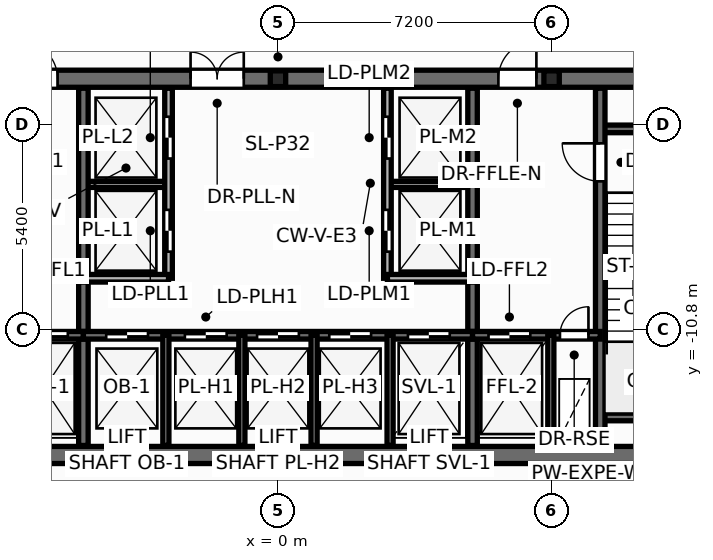
"""IFC4 building model, lengths in metres.
Left out: names, types, materials, properties, quantities, classifications, styles, units other than length and angle.
Written with IfcOpenShell. Run it as: python <this file> out.ifc"""

import sys

from ifc_helpers import new_model, si_unit, direction, frame, frame_2d, origin, origin_2d, place, context, subcontext, project, spatial, rectangle, i_section, extrude, element, fill, save


model = new_model("IFC4")
c1 = context("Model", 3, precision=1e-05, world=origin(), true_north=direction((0.0, 1.0)))
c2 = subcontext(c1, "Body", "Model", "MODEL_VIEW")
j1 = project(units=[si_unit("LENGTHUNIT", "METRE"), si_unit("PLANEANGLEUNIT", "RADIAN")], contexts=[c1])
p1 = place(None, origin())
s1 = spatial("IfcSite", under=j1, at=p1, CompositionType="ELEMENT")
p2 = place(p1, origin())
s2 = spatial("IfcBuilding", under=s1, at=p2, CompositionType="ELEMENT")
p3 = place(p2, origin())
s3 = spatial("IfcBuildingStorey", under=s2, at=p3, CompositionType="ELEMENT", Elevation=0.0)
for number, where, z_axis, x_axis in (
    (1, (0.0, -4.2, 0.0), (0.0, 0.0, 1.0), (1.0, 0.0, 0.0)),
    (2, (7.2, -4.2, 0.0), (0.0, 0.0, 1.0), (1.0, 0.0, 0.0)),
):
    element("IfcColumn", number, at=place(p3, frame(where, z_axis=z_axis, x_axis=x_axis)), inside=s3, PredefinedType="PILASTER", context=c2, shape_type="SweptSolid", body=[
        extrude(i_section(OverallWidth=0.405, OverallDepth=0.414, WebThickness=0.022, FlangeThickness=0.032, at=origin_2d()), origin(), (0.0, 0.0, 1.0), 5.4),
    ])
p4 = place(p3, frame((5.583, 11.29, -0.015), z_axis=(0.0, 0.0, 1.0), x_axis=(0.616945483616, -0.787005889588, 0.0)))
e3 = element("IfcWall", 3, at=p4, inside=s3, PredefinedType="STANDARD", context=c2, shape_type="SweptSolid", body=[
    extrude(rectangle(XDim=28.627, YDim=0.28, at=frame_2d((14.314, 0.0))), origin(), (0.0, 0.0, 1.0), 3.91),
])
p5 = place(p4, frame((2.979, 0.0, 0.015)))
e4 = element("IfcOpeningElement", 4, at=p5, cuts=e3, PredefinedType="OPENING", context=c2, shape_type="SweptSolid", body=[
    extrude(rectangle(XDim=1.206, YDim=2.154, at=frame_2d((0.6, 1.077))), frame((0.0, 0.15, 0.0), z_axis=(0.0, -1.0, 0.0), x_axis=(1.0, 0.0, 0.0)), (0.0, 0.0, 1.0), 0.3),
])
p6 = place(p3, frame((-23.245, -11.24, -0.015), z_axis=(0.0, 0.0, 1.0), x_axis=(0.616945483616, 0.787005889588, 0.0)))
e5 = element("IfcWall", 5, at=p6, inside=s3, PredefinedType="STANDARD", context=c2, shape_type="SweptSolid", body=[
    extrude(rectangle(XDim=28.627, YDim=0.28, at=frame_2d((14.314, 0.0))), origin(), (0.0, 0.0, 1.0), 3.91),
])
for number, where, z_axis, x_axis in (
    (6, (-5.12, -6.98, 0.0), (0.0, 0.0, 1.0), (1.0, 0.0, 0.0)),
    (7, (2.88, -6.98, 0.0), (0.0, 0.0, 1.0), (1.0, 0.0, 0.0)),
):
    element("IfcWall", number, at=place(p3, frame(where, z_axis=z_axis, x_axis=x_axis)), inside=s3, PredefinedType="PARTITIONING", context=c2, shape_type="SweptSolid", body=[
        extrude(rectangle(XDim=2.24, YDim=0.16, at=frame_2d((1.12, 0.0))), origin(), (0.0, 0.0, 1.0), 5.12),
    ])
p7 = place(p3, frame((-12.75, -14.1, 0.0), z_axis=(0.0, 0.0, 1.0), x_axis=(1.0, 0.0, 0.0)))
e8 = element("IfcWall", 8, at=p7, inside=s3, PredefinedType="SHEAR", context=c2, shape_type="SweptSolid", body=[
    extrude(rectangle(XDim=25.5, YDim=0.45, at=frame_2d((12.75, 0.0))), origin(), (0.0, 0.0, 1.0), 5.4),
])
p8 = place(p3, frame((-12.65, -4.2, 0.0), z_axis=(0.0, 0.0, 1.0), x_axis=(1.0, 0.0, 0.0)))
e9 = element("IfcWall", 9, at=p8, inside=s3, PredefinedType="SHEAR", context=c2, shape_type="SweptSolid", body=[
    extrude(rectangle(XDim=25.3, YDim=0.45, at=frame_2d((12.65, 0.0))), origin(), (0.0, 0.0, 1.0), 5.4),
])
p9 = place(p8, frame((1.85, 0.0, 0.0)))
e10 = element("IfcOpeningElement", 10, at=p9, cuts=e9, PredefinedType="OPENING", context=c2, shape_type="SweptSolid", body=[
    extrude(rectangle(XDim=0.756, YDim=2.054, at=frame_2d((0.375, 1.027))), frame((0.0, 0.235, 0.0), z_axis=(0.0, -1.0, 0.0), x_axis=(1.0, 0.0, 0.0)), (0.0, 0.0, 1.0), 0.47),
])
p10 = place(p8, frame((22.65, 0.0, 0.0)))
e11 = element("IfcOpeningElement", 11, at=p10, cuts=e9, PredefinedType="OPENING", context=c2, shape_type="SweptSolid", body=[
    extrude(rectangle(XDim=0.756, YDim=2.054, at=frame_2d((0.375, 1.027))), frame((0.0, 0.235, 0.0), z_axis=(0.0, -1.0, 0.0), x_axis=(1.0, 0.0, 0.0)), (0.0, 0.0, 1.0), 0.47),
])
p11 = place(p8, frame((5.85, 0.0, 0.0)))
e12 = element("IfcOpeningElement", 12, at=p11, cuts=e9, PredefinedType="OPENING", context=c2, shape_type="SweptSolid", body=[
    extrude(rectangle(XDim=1.006, YDim=2.104, at=frame_2d((0.5, 1.052))), frame((0.0, 0.235, 0.0), z_axis=(0.0, -1.0, 0.0), x_axis=(1.0, 0.0, 0.0)), (0.0, 0.0, 1.0), 0.47),
])
p12 = place(p8, frame((10.35, 0.0, 0.0)))
e13 = element("IfcOpeningElement", 13, at=p12, cuts=e9, PredefinedType="OPENING", context=c2, shape_type="SweptSolid", body=[
    extrude(rectangle(XDim=1.406, YDim=2.154, at=frame_2d((0.7, 1.077))), frame((0.0, 0.235, 0.0), z_axis=(0.0, -1.0, 0.0), x_axis=(1.0, 0.0, 0.0)), (0.0, 0.0, 1.0), 0.47),
])
p13 = place(p8, frame((18.45, 0.0, 0.0)))
e14 = element("IfcOpeningElement", 14, at=p13, cuts=e9, PredefinedType="OPENING", context=c2, shape_type="SweptSolid", body=[
    extrude(rectangle(XDim=1.006, YDim=2.104, at=frame_2d((0.5, 1.052))), frame((0.0, 0.235, 0.0), z_axis=(0.0, -1.0, 0.0), x_axis=(1.0, 0.0, 0.0)), (0.0, 0.0, 1.0), 0.47),
])
for number, where, z_axis, x_axis in (
    (15, (8.48, -5.52, 0.0), (0.0, 0.0, 1.0), (1.0, 0.0, 0.0)),
    (16, (8.48, -13.1, 0.0), (0.0, 0.0, 1.0), (1.0, 0.0, 0.0)),
):
    element("IfcWall", number, at=place(p3, frame(where, z_axis=z_axis, x_axis=x_axis)), inside=s3, PredefinedType="SOLIDWALL", context=c2, shape_type="SweptSolid", body=[
        extrude(rectangle(XDim=3.87, YDim=0.2, at=frame_2d((1.935, 0.0))), origin(), (0.0, 0.0, 1.0), 5.4),
    ])
p14 = place(p3, frame((8.48, -13.85, 0.0), z_axis=(0.0, 0.0, 1.0), x_axis=(0.0, 1.0, 0.0)))
e17 = element("IfcWall", 17, at=p14, inside=s3, PredefinedType="SHEAR", context=c2, shape_type="SweptSolid", body=[
    extrude(rectangle(XDim=9.4, YDim=0.25, at=frame_2d((4.7, 0.0))), origin(), (0.0, 0.0, 1.0), 5.4),
])
p15 = place(p14, frame((6.95, 0.0, 0.0)))
e18 = element("IfcOpeningElement", 18, at=p15, cuts=e17, PredefinedType="OPENING", context=c2, shape_type="SweptSolid", body=[
    extrude(rectangle(XDim=1.006, YDim=2.104, at=frame_2d((0.5, 1.052))), frame((0.0, 0.135, 0.0), z_axis=(0.0, -1.0, 0.0), x_axis=(1.0, 0.0, 0.0)), (0.0, 0.0, 1.0), 0.27),
])
for number, where, z_axis, x_axis in (
    (19, (-5.12, -13.85, 0.0), (0.0, 0.0, 1.0), (0.0, 1.0, 0.0)),
    (20, (5.12, -13.85, 0.0), (0.0, 0.0, 1.0), (0.0, 1.0, 0.0)),
):
    element("IfcWall", number, at=place(p3, frame(where, z_axis=z_axis, x_axis=x_axis)), inside=s3, PredefinedType="SHEAR", context=c2, shape_type="SweptSolid", body=[
        extrude(rectangle(XDim=9.4, YDim=0.25, at=frame_2d((4.7, 0.0))), origin(), (0.0, 0.0, 1.0), 5.4),
    ])
p16 = place(p3, frame((-8.48, -10.95, 0.0), z_axis=(0.0, 0.0, 1.0), x_axis=(1.0, 0.0, 0.0)))
e21 = element("IfcWall", 21, at=p16, inside=s3, PredefinedType="SOLIDWALL", context=c2, shape_type="SweptSolid", body=[
    extrude(rectangle(XDim=3.36, YDim=0.2, at=frame_2d((1.68, 0.0))), origin(), (0.0, 0.0, 1.0), 5.4),
])
p17 = place(p16, frame((0.28, 0.0, 0.0)))
e22 = element("IfcOpeningElement", 22, at=p17, cuts=e21, PredefinedType="OPENING", context=c2, shape_type="SweptSolid", body=[
    extrude(rectangle(XDim=0.756, YDim=2.054, at=frame_2d((0.375, 1.027))), frame((0.0, 0.11, 0.0), z_axis=(0.0, -1.0, 0.0), x_axis=(1.0, 0.0, 0.0)), (0.0, 0.0, 1.0), 0.22),
])
p18 = place(p16, frame((1.85, 0.0, 0.0)))
e23 = element("IfcOpeningElement", 23, at=p18, cuts=e21, PredefinedType="OPENING", context=c2, shape_type="SweptSolid", body=[
    extrude(rectangle(XDim=1.106, YDim=2.104, at=frame_2d((0.55, 1.052))), frame((0.0, 0.11, 0.0), z_axis=(0.0, -1.0, 0.0), x_axis=(1.0, 0.0, 0.0)), (0.0, 0.0, 1.0), 0.22),
])
p19 = place(p3, frame((-5.12, -10.95, 0.0), z_axis=(0.0, 0.0, 1.0), x_axis=(1.0, 0.0, 0.0)))
e24 = element("IfcWall", 24, at=p19, inside=s3, PredefinedType="SOLIDWALL", context=c2, shape_type="SweptSolid", body=[
    extrude(rectangle(XDim=10.24, YDim=0.2, at=frame_2d((5.12, 0.0))), origin(), (0.0, 0.0, 1.0), 5.4),
])
p20 = place(p19, frame((0.6, 0.0, 0.0)))
e25 = element("IfcOpeningElement", 25, at=p20, cuts=e24, PredefinedType="OPENING", context=c2, shape_type="SweptSolid", body=[
    extrude(rectangle(XDim=1.106, YDim=2.104, at=frame_2d((0.55, 1.052))), frame((0.0, 0.11, 0.0), z_axis=(0.0, -1.0, 0.0), x_axis=(1.0, 0.0, 0.0)), (0.0, 0.0, 1.0), 0.22),
])
p21 = place(p19, frame((2.67, 0.0, 0.0)))
e26 = element("IfcOpeningElement", 26, at=p21, cuts=e24, PredefinedType="OPENING", context=c2, shape_type="SweptSolid", body=[
    extrude(rectangle(XDim=1.106, YDim=2.104, at=frame_2d((0.55, 1.052))), frame((0.0, 0.11, 0.0), z_axis=(0.0, -1.0, 0.0), x_axis=(1.0, 0.0, 0.0)), (0.0, 0.0, 1.0), 0.22),
])
p22 = place(p19, frame((4.57, 0.0, 0.0)))
e27 = element("IfcOpeningElement", 27, at=p22, cuts=e24, PredefinedType="OPENING", context=c2, shape_type="SweptSolid", body=[
    extrude(rectangle(XDim=1.106, YDim=2.104, at=frame_2d((0.55, 1.052))), frame((0.0, 0.11, 0.0), z_axis=(0.0, -1.0, 0.0), x_axis=(1.0, 0.0, 0.0)), (0.0, 0.0, 1.0), 0.22),
])
p23 = place(p19, frame((6.47, 0.0, 0.0)))
e28 = element("IfcOpeningElement", 28, at=p23, cuts=e24, PredefinedType="OPENING", context=c2, shape_type="SweptSolid", body=[
    extrude(rectangle(XDim=1.106, YDim=2.104, at=frame_2d((0.55, 1.052))), frame((0.0, 0.11, 0.0), z_axis=(0.0, -1.0, 0.0), x_axis=(1.0, 0.0, 0.0)), (0.0, 0.0, 1.0), 0.22),
])
p24 = place(p19, frame((8.54, 0.0, 0.0)))
e29 = element("IfcOpeningElement", 29, at=p24, cuts=e24, PredefinedType="OPENING", context=c2, shape_type="SweptSolid", body=[
    extrude(rectangle(XDim=1.106, YDim=2.104, at=frame_2d((0.55, 1.052))), frame((0.0, 0.11, 0.0), z_axis=(0.0, -1.0, 0.0), x_axis=(1.0, 0.0, 0.0)), (0.0, 0.0, 1.0), 0.22),
])
p25 = place(p3, frame((5.12, -10.95, 0.0), z_axis=(0.0, 0.0, 1.0), x_axis=(1.0, 0.0, 0.0)))
e30 = element("IfcWall", 30, at=p25, inside=s3, PredefinedType="SOLIDWALL", context=c2, shape_type="SweptSolid", body=[
    extrude(rectangle(XDim=3.36, YDim=0.2, at=frame_2d((1.68, 0.0))), origin(), (0.0, 0.0, 1.0), 5.4),
])
p26 = place(p25, frame((0.42, 0.0, 0.0)))
e31 = element("IfcOpeningElement", 31, at=p26, cuts=e30, PredefinedType="OPENING", context=c2, shape_type="SweptSolid", body=[
    extrude(rectangle(XDim=1.106, YDim=2.104, at=frame_2d((0.55, 1.052))), frame((0.0, 0.11, 0.0), z_axis=(0.0, -1.0, 0.0), x_axis=(1.0, 0.0, 0.0)), (0.0, 0.0, 1.0), 0.22),
])
p27 = place(p25, frame((2.3, 0.0, 0.0)))
e32 = element("IfcOpeningElement", 32, at=p27, cuts=e30, PredefinedType="OPENING", context=c2, shape_type="SweptSolid", body=[
    extrude(rectangle(XDim=0.756, YDim=2.054, at=frame_2d((0.375, 1.027))), frame((0.0, 0.11, 0.0), z_axis=(0.0, -1.0, 0.0), x_axis=(1.0, 0.0, 0.0)), (0.0, 0.0, 1.0), 0.22),
])
for number, where, z_axis, x_axis in (
    (33, (7.18, -13.85, 0.0), (0.0, 0.0, 1.0), (0.0, 1.0, 0.0)),
    (34, (-2.95, -13.85, 0.0), (0.0, 0.0, 1.0), (0.0, 1.0, 0.0)),
    (35, (2.95, -13.85, 0.0), (0.0, 0.0, 1.0), (0.0, 1.0, 0.0)),
):
    element("IfcWall", number, at=place(p3, frame(where, z_axis=z_axis, x_axis=x_axis)), inside=s3, PredefinedType="PARTITIONING", context=c2, shape_type="SweptSolid", body=[
        extrude(rectangle(XDim=2.9, YDim=0.16, at=frame_2d((1.45, 0.0))), origin(), (0.0, 0.0, 1.0), 4.145),
    ])
p28 = place(p3, frame((-2.88, -9.45, 0.0), z_axis=(0.0, 0.0, 1.0), x_axis=(0.0, 1.0, 0.0)))
e36 = element("IfcWall", 36, at=p28, inside=s3, PredefinedType="SOLIDWALL", context=c2, shape_type="SweptSolid", body=[
    extrude(rectangle(XDim=5.0, YDim=0.2, at=frame_2d((2.5, 0.0))), origin(), (0.0, 0.0, 1.0), 5.12),
])
p29 = place(p28, frame((0.7, 0.0, 0.0)))
e37 = element("IfcOpeningElement", 37, at=p29, cuts=e36, PredefinedType="OPENING", context=c2, shape_type="SweptSolid", body=[
    extrude(rectangle(XDim=1.106, YDim=2.104, at=frame_2d((0.55, 1.052))), frame((0.0, 0.11, 0.0), z_axis=(0.0, -1.0, 0.0), x_axis=(1.0, 0.0, 0.0)), (0.0, 0.0, 1.0), 0.22),
])
p30 = place(p28, frame((3.15, 0.0, 0.0)))
e38 = element("IfcOpeningElement", 38, at=p30, cuts=e36, PredefinedType="OPENING", context=c2, shape_type="SweptSolid", body=[
    extrude(rectangle(XDim=1.106, YDim=2.104, at=frame_2d((0.55, 1.052))), frame((0.0, 0.11, 0.0), z_axis=(0.0, -1.0, 0.0), x_axis=(1.0, 0.0, 0.0)), (0.0, 0.0, 1.0), 0.22),
])
p31 = place(p3, frame((-5.12, -9.45, 0.0), z_axis=(0.0, 0.0, 1.0), x_axis=(1.0, 0.0, 0.0)))
e39 = element("IfcWall", 39, at=p31, inside=s3, PredefinedType="SOLIDWALL", context=c2, shape_type="SweptSolid", body=[
    extrude(rectangle(XDim=2.24, YDim=0.2, at=frame_2d((1.12, 0.0))), origin(), (0.0, 0.0, 1.0), 5.12),
])
p32 = place(p3, frame((2.88, -9.45, 0.0), z_axis=(0.0, 0.0, 1.0), x_axis=(0.0, 1.0, 0.0)))
e40 = element("IfcWall", 40, at=p32, inside=s3, PredefinedType="SOLIDWALL", context=c2, shape_type="SweptSolid", body=[
    extrude(rectangle(XDim=5.0, YDim=0.2, at=frame_2d((2.5, 0.0))), origin(), (0.0, 0.0, 1.0), 5.12),
])
p33 = place(p32, frame((0.7, 0.0, 0.0)))
e41 = element("IfcOpeningElement", 41, at=p33, cuts=e40, PredefinedType="OPENING", context=c2, shape_type="SweptSolid", body=[
    extrude(rectangle(XDim=1.106, YDim=2.104, at=frame_2d((0.55, 1.052))), frame((0.0, 0.11, 0.0), z_axis=(0.0, -1.0, 0.0), x_axis=(1.0, 0.0, 0.0)), (0.0, 0.0, 1.0), 0.22),
])
p34 = place(p32, frame((3.15, 0.0, 0.0)))
e42 = element("IfcOpeningElement", 42, at=p34, cuts=e40, PredefinedType="OPENING", context=c2, shape_type="SweptSolid", body=[
    extrude(rectangle(XDim=1.106, YDim=2.104, at=frame_2d((0.55, 1.052))), frame((0.0, 0.11, 0.0), z_axis=(0.0, -1.0, 0.0), x_axis=(1.0, 0.0, 0.0)), (0.0, 0.0, 1.0), 0.22),
])
p35 = place(p3, frame((2.88, -9.45, 0.0), z_axis=(0.0, 0.0, 1.0), x_axis=(1.0, 0.0, 0.0)))
e43 = element("IfcWall", 43, at=p35, inside=s3, PredefinedType="SOLIDWALL", context=c2, shape_type="SweptSolid", body=[
    extrude(rectangle(XDim=2.24, YDim=0.2, at=frame_2d((1.12, 0.0))), origin(), (0.0, 0.0, 1.0), 5.12),
])
for number, where, z_axis, x_axis in (
    (44, (-0.95, -13.85, 0.0), (0.0, 0.0, 1.0), (0.0, 1.0, 0.0)),
    (45, (0.95, -13.85, 0.0), (0.0, 0.0, 1.0), (0.0, 1.0, 0.0)),
):
    element("IfcWall", number, at=place(p3, frame(where, z_axis=z_axis, x_axis=x_axis)), inside=s3, PredefinedType="PARTITIONING", context=c2, shape_type="SweptSolid", body=[
        extrude(rectangle(XDim=2.9, YDim=0.16, at=frame_2d((1.45, 0.0))), origin(), (0.0, 0.0, 1.0), 4.145),
    ])
p36 = place(p29, origin())
e46 = element("IfcDoor", 46, at=p36, inside=s3, OperationType="DOUBLE_DOOR_SLIDING", PredefinedType="DOOR", context=c2, shape_type="SweptSolid", body=[
    extrude(rectangle(XDim=1.1, YDim=2.1, at=frame_2d((0.55, 1.05))), frame((0.0, 0.025, 0.0), z_axis=(0.0, -1.0, 0.0), x_axis=(1.0, 0.0, 0.0)), (0.0, 0.0, 1.0), 0.05),
])
fill(e37, e46)
p37 = place(p30, origin())
e47 = element("IfcDoor", 47, at=p37, inside=s3, OperationType="DOUBLE_DOOR_SLIDING", PredefinedType="DOOR", context=c2, shape_type="SweptSolid", body=[
    extrude(rectangle(XDim=1.1, YDim=2.1, at=frame_2d((0.55, 1.05))), frame((0.0, 0.025, 0.0), z_axis=(0.0, -1.0, 0.0), x_axis=(1.0, 0.0, 0.0)), (0.0, 0.0, 1.0), 0.05),
])
fill(e38, e47)
p38 = place(p33, origin())
e48 = element("IfcDoor", 48, at=p38, inside=s3, OperationType="DOUBLE_DOOR_SLIDING", PredefinedType="DOOR", context=c2, shape_type="SweptSolid", body=[
    extrude(rectangle(XDim=1.1, YDim=2.1, at=frame_2d((0.55, 1.05))), frame((0.0, 0.025, 0.0), z_axis=(0.0, -1.0, 0.0), x_axis=(1.0, 0.0, 0.0)), (0.0, 0.0, 1.0), 0.05),
])
fill(e41, e48)
p39 = place(p34, origin())
e49 = element("IfcDoor", 49, at=p39, inside=s3, OperationType="DOUBLE_DOOR_SLIDING", PredefinedType="DOOR", context=c2, shape_type="SweptSolid", body=[
    extrude(rectangle(XDim=1.1, YDim=2.1, at=frame_2d((0.55, 1.05))), frame((0.0, 0.025, 0.0), z_axis=(0.0, -1.0, 0.0), x_axis=(1.0, 0.0, 0.0)), (0.0, 0.0, 1.0), 0.05),
])
fill(e42, e49)
p40 = place(p15, origin())
e50 = element("IfcDoor", 50, at=p40, inside=s3, OperationType="SINGLE_SWING_RIGHT", PredefinedType="DOOR", context=c2, shape_type="SweptSolid", body=[
    extrude(rectangle(XDim=1.0, YDim=2.1, at=frame_2d((0.5, 1.05))), frame((0.0, 0.025, 0.0), z_axis=(0.0, -1.0, 0.0), x_axis=(1.0, 0.0, 0.0)), (0.0, 0.0, 1.0), 0.05),
])
fill(e18, e50)
p41 = place(p18, origin())
e51 = element("IfcDoor", 51, at=p41, inside=s3, OperationType="DOUBLE_DOOR_SLIDING", PredefinedType="DOOR", context=c2, shape_type="SweptSolid", body=[
    extrude(rectangle(XDim=1.1, YDim=2.1, at=frame_2d((0.55, 1.05))), frame((0.0, 0.025, 0.0), z_axis=(0.0, -1.0, 0.0), x_axis=(1.0, 0.0, 0.0)), (0.0, 0.0, 1.0), 0.05),
])
fill(e23, e51)
p42 = place(p26, origin())
e52 = element("IfcDoor", 52, at=p42, inside=s3, OperationType="DOUBLE_DOOR_SLIDING", PredefinedType="DOOR", context=c2, shape_type="SweptSolid", body=[
    extrude(rectangle(XDim=1.1, YDim=2.1, at=frame_2d((0.55, 1.05))), frame((0.0, 0.025, 0.0), z_axis=(0.0, -1.0, 0.0), x_axis=(1.0, 0.0, 0.0)), (0.0, 0.0, 1.0), 0.05),
])
fill(e31, e52)
p43 = place(p27, origin())
e53 = element("IfcDoor", 53, at=p43, inside=s3, OperationType="SINGLE_SWING_RIGHT", PredefinedType="DOOR", context=c2, shape_type="SweptSolid", body=[
    extrude(rectangle(XDim=0.75, YDim=2.05, at=frame_2d((0.375, 1.025))), frame((0.0, 0.025, 0.0), z_axis=(0.0, -1.0, 0.0), x_axis=(1.0, 0.0, 0.0)), (0.0, 0.0, 1.0), 0.05),
])
fill(e32, e53)
p44 = place(p20, origin())
e54 = element("IfcDoor", 54, at=p44, inside=s3, OperationType="DOUBLE_DOOR_SLIDING", PredefinedType="DOOR", context=c2, shape_type="SweptSolid", body=[
    extrude(rectangle(XDim=1.1, YDim=2.1, at=frame_2d((0.55, 1.05))), frame((0.0, 0.025, 0.0), z_axis=(0.0, -1.0, 0.0), x_axis=(1.0, 0.0, 0.0)), (0.0, 0.0, 1.0), 0.05),
])
fill(e25, e54)
p45 = place(p21, origin())
e55 = element("IfcDoor", 55, at=p45, inside=s3, OperationType="DOUBLE_DOOR_SLIDING", PredefinedType="DOOR", context=c2, shape_type="SweptSolid", body=[
    extrude(rectangle(XDim=1.1, YDim=2.1, at=frame_2d((0.55, 1.05))), frame((0.0, 0.025, 0.0), z_axis=(0.0, -1.0, 0.0), x_axis=(1.0, 0.0, 0.0)), (0.0, 0.0, 1.0), 0.05),
])
fill(e26, e55)
p46 = place(p22, origin())
e56 = element("IfcDoor", 56, at=p46, inside=s3, OperationType="DOUBLE_DOOR_SLIDING", PredefinedType="DOOR", context=c2, shape_type="SweptSolid", body=[
    extrude(rectangle(XDim=1.1, YDim=2.1, at=frame_2d((0.55, 1.05))), frame((0.0, 0.025, 0.0), z_axis=(0.0, -1.0, 0.0), x_axis=(1.0, 0.0, 0.0)), (0.0, 0.0, 1.0), 0.05),
])
fill(e27, e56)
p47 = place(p23, origin())
e57 = element("IfcDoor", 57, at=p47, inside=s3, OperationType="DOUBLE_DOOR_SLIDING", PredefinedType="DOOR", context=c2, shape_type="SweptSolid", body=[
    extrude(rectangle(XDim=1.1, YDim=2.1, at=frame_2d((0.55, 1.05))), frame((0.0, 0.025, 0.0), z_axis=(0.0, -1.0, 0.0), x_axis=(1.0, 0.0, 0.0)), (0.0, 0.0, 1.0), 0.05),
])
fill(e28, e57)
p48 = place(p24, origin())
e58 = element("IfcDoor", 58, at=p48, inside=s3, OperationType="DOUBLE_DOOR_SLIDING", PredefinedType="DOOR", context=c2, shape_type="SweptSolid", body=[
    extrude(rectangle(XDim=1.1, YDim=2.1, at=frame_2d((0.55, 1.05))), frame((0.0, 0.025, 0.0), z_axis=(0.0, -1.0, 0.0), x_axis=(1.0, 0.0, 0.0)), (0.0, 0.0, 1.0), 0.05),
])
fill(e29, e58)
p49 = place(p11, origin())
e59 = element("IfcDoor", 59, at=p49, inside=s3, OperationType="SINGLE_SWING_LEFT", PredefinedType="DOOR", context=c2, shape_type="SweptSolid", body=[
    extrude(rectangle(XDim=1.0, YDim=2.1, at=frame_2d((0.5, 1.05))), frame((0.0, 0.025, 0.0), z_axis=(0.0, -1.0, 0.0), x_axis=(1.0, 0.0, 0.0)), (0.0, 0.0, 1.0), 0.05),
])
fill(e12, e59)
p50 = place(p12, origin())
e60 = element("IfcDoor", 60, at=p50, inside=s3, OperationType="DOUBLE_DOOR_SINGLE_SWING", PredefinedType="DOOR", context=c2, shape_type="SweptSolid", body=[
    extrude(rectangle(XDim=1.4, YDim=2.15, at=frame_2d((0.7, 1.075))), frame((0.0, 0.025, 0.0), z_axis=(0.0, -1.0, 0.0), x_axis=(1.0, 0.0, 0.0)), (0.0, 0.0, 1.0), 0.05),
])
fill(e13, e60)
p51 = place(p13, origin())
e61 = element("IfcDoor", 61, at=p51, inside=s3, OperationType="SINGLE_SWING_RIGHT", PredefinedType="DOOR", context=c2, shape_type="SweptSolid", body=[
    extrude(rectangle(XDim=1.0, YDim=2.1, at=frame_2d((0.5, 1.05))), frame((0.0, 0.025, 0.0), z_axis=(0.0, -1.0, 0.0), x_axis=(1.0, 0.0, 0.0)), (0.0, 0.0, 1.0), 0.05),
])
fill(e14, e61)
save(model, sys.argv[1])
